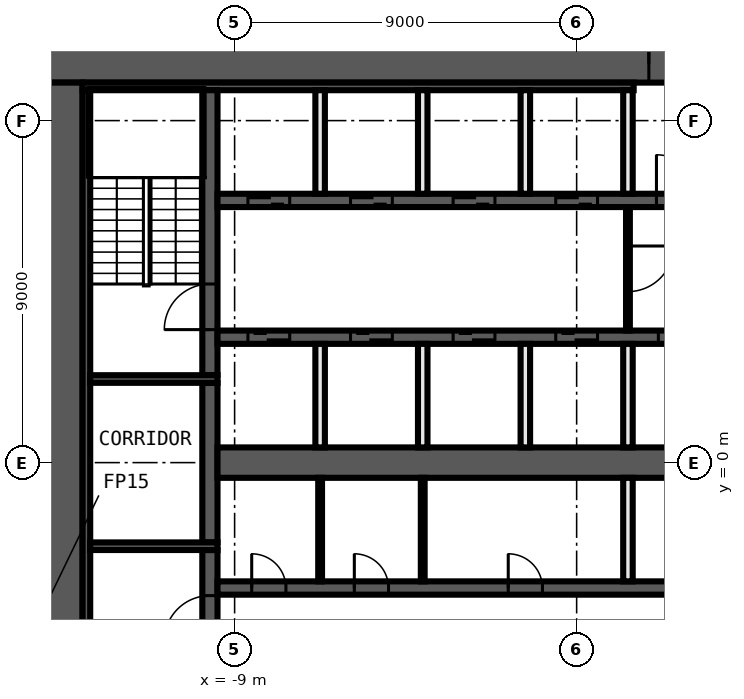
"""IFC4 building model, lengths in metres.
Left out: names, types, materials, properties, quantities, classifications, styles, units other than length and angle.
Written with IfcOpenShell. Run it as: python <this file> out.ifc"""

import sys

from ifc_helpers import new_model, si_unit, direction, frame, frame_2d, origin, place, context, subcontext, project, spatial, rectangle, extrude, element, fill, save


model = new_model("IFC4")
c1 = context("Model", 3, precision=1e-05, world=origin(), true_north=direction((0.0, 1.0)))
c2 = subcontext(c1, "Body", "Model", "MODEL_VIEW")
j1 = project(units=[si_unit("LENGTHUNIT", "METRE"), si_unit("PLANEANGLEUNIT", "RADIAN")], contexts=[c1])
p1 = place(None, origin())
s1 = spatial("IfcSite", under=j1, at=p1, CompositionType="ELEMENT")
p2 = place(p1, origin())
s2 = spatial("IfcBuilding", under=s1, at=p2, CompositionType="ELEMENT")
p3 = place(p2, frame((0.0, 0.0, 102.6)))
s3 = spatial("IfcBuildingStorey", under=s2, at=p3, CompositionType="ELEMENT", Elevation=102.6)
p4 = place(p3, frame((-14.0, 10.5, 0.0), z_axis=(0.0, 0.0, 1.0), x_axis=(1.0, 0.0, 0.0)))
e1 = element("IfcWall", 1, at=p4, inside=s3, PredefinedType="SHEAR", context=c2, shape_type="SweptSolid", body=[
    extrude(rectangle(XDim=28.0, YDim=1.0, at=frame_2d((14.0, 0.0))), origin(), (0.0, 0.0, 1.0), 3.3),
])
p5 = place(p4, frame((15.9, 0.0, 0.0)))
e2 = element("IfcOpeningElement", 2, at=p5, cuts=e1, PredefinedType="OPENING", context=c2, shape_type="SweptSolid", body=[
    extrude(rectangle(XDim=1.6, YDim=2.1, at=frame_2d((0.8, 1.05))), frame((0.0, 0.51, 0.0), z_axis=(0.0, -1.0, 0.0), x_axis=(1.0, 0.0, 0.0)), (0.0, 0.0, 1.0), 1.02),
])
p6 = place(p3, frame((-13.5, -10.0, 0.0), z_axis=(0.0, 0.0, 1.0), x_axis=(0.0, 1.0, 0.0)))
e3 = element("IfcWall", 3, at=p6, inside=s3, PredefinedType="SHEAR", context=c2, shape_type="SweptSolid", body=[
    extrude(rectangle(XDim=20.0, YDim=1.0, at=frame_2d((10.0, 0.0))), origin(), (0.0, 0.0, 1.0), 3.3),
])
p7 = place(p3, frame((-13.0, 9.9, 0.0), z_axis=(0.0, 0.0, 1.0), x_axis=(1.0, 0.0, 0.0)))
e4 = element("IfcWall", 4, at=p7, inside=s3, PredefinedType="SHEAR", context=c2, shape_type="SweptSolid", body=[
    extrude(rectangle(XDim=14.5, YDim=0.2, at=frame_2d((7.25, 0.0))), origin(), (0.0, 0.0, 1.0), 3.3),
])
p8 = place(p3, frame((-12.9, -9.8, 0.0), z_axis=(0.0, 0.0, 1.0), x_axis=(0.0, 1.0, 0.0)))
e5 = element("IfcWall", 5, at=p8, inside=s3, PredefinedType="SHEAR", context=c2, shape_type="SweptSolid", body=[
    extrude(rectangle(XDim=19.6, YDim=0.2, at=frame_2d((9.8, 0.0))), origin(), (0.0, 0.0, 1.0), 3.3),
])
p9 = place(p3, frame((-9.65, -9.8, 0.0), z_axis=(0.0, 0.0, 1.0), x_axis=(0.0, 1.0, 0.0)))
e6 = element("IfcWall", 6, at=p9, inside=s3, PredefinedType="SHEAR", context=c2, shape_type="SweptSolid", body=[
    extrude(rectangle(XDim=7.5, YDim=0.4, at=frame_2d((3.75, 0.0))), origin(), (0.0, 0.0, 1.0), 3.3),
])
p10 = place(p9, frame((5.1, 0.0, 0.0)))
e7 = element("IfcOpeningElement", 7, at=p10, cuts=e6, PredefinedType="OPENING", context=c2, shape_type="SweptSolid", body=[
    extrude(rectangle(XDim=1.2, YDim=2.1, at=frame_2d((0.6, 1.05))), frame((0.0, 0.21, 0.0), z_axis=(0.0, -1.0, 0.0), x_axis=(1.0, 0.0, 0.0)), (0.0, 0.0, 1.0), 0.42),
])
p11 = place(p3, frame((-9.65, -2.1, 0.0), z_axis=(0.0, 0.0, 1.0), x_axis=(0.0, 1.0, 0.0)))
e8 = element("IfcWall", 8, at=p11, inside=s3, PredefinedType="SHEAR", context=c2, shape_type="SweptSolid", body=[
    extrude(rectangle(XDim=4.2, YDim=0.4, at=frame_2d((2.1, 0.0))), origin(), (0.0, 0.0, 1.0), 3.3),
])
p12 = place(p3, frame((-9.65, 2.3, 0.0), z_axis=(0.0, 0.0, 1.0), x_axis=(0.0, 1.0, 0.0)))
e9 = element("IfcWall", 9, at=p12, inside=s3, PredefinedType="SHEAR", context=c2, shape_type="SweptSolid", body=[
    extrude(rectangle(XDim=7.5, YDim=0.4, at=frame_2d((3.75, 0.0))), origin(), (0.0, 0.0, 1.0), 3.3),
])
p13 = place(p12, frame((1.2, 0.0, 0.0)))
e10 = element("IfcOpeningElement", 10, at=p13, cuts=e9, PredefinedType="OPENING", context=c2, shape_type="SweptSolid", body=[
    extrude(rectangle(XDim=1.2, YDim=2.1, at=frame_2d((0.6, 1.05))), frame((0.0, 0.21, 0.0), z_axis=(0.0, -1.0, 0.0), x_axis=(1.0, 0.0, 0.0)), (0.0, 0.0, 1.0), 0.42),
])
for number, where, z_axis, x_axis in (
    (11, (-9.45, 2.2, 0.0), (0.0, 0.0, 1.0), (-1.0, 0.0, 0.0)),
    (12, (-9.45, -2.2, 0.0), (0.0, 0.0, 1.0), (-1.0, 0.0, 0.0)),
):
    element("IfcWall", number, at=place(p3, frame(where, z_axis=z_axis, x_axis=x_axis)), inside=s3, PredefinedType="SHEAR", context=c2, shape_type="SweptSolid", body=[
        extrude(rectangle(XDim=3.35, YDim=0.2, at=frame_2d((1.675, 0.0))), origin(), (0.0, 0.0, 1.0), 3.3),
    ])
p14 = place(p3, frame((-9.45, 6.9, 0.0), z_axis=(0.0, 0.0, 1.0), x_axis=(1.0, 0.0, 0.0)))
e13 = element("IfcWall", 13, at=p14, inside=s3, PredefinedType="SHEAR", context=c2, shape_type="SweptSolid", body=[
    extrude(rectangle(XDim=18.9, YDim=0.35, at=frame_2d((9.45, 0.0))), origin(), (0.0, 0.0, 1.0), 3.3),
])
p15 = place(p14, frame((0.8, 0.0, 0.0)))
e14 = element("IfcOpeningElement", 14, at=p15, cuts=e13, PredefinedType="OPENING", context=c2, shape_type="SweptSolid", body=[
    extrude(rectangle(XDim=1.1, YDim=2.1, at=frame_2d((0.55, 1.05))), frame((0.0, 0.185, 0.0), z_axis=(0.0, -1.0, 0.0), x_axis=(1.0, 0.0, 0.0)), (0.0, 0.0, 1.0), 0.37),
])
p16 = place(p14, frame((3.5, 0.0, 0.0)))
e15 = element("IfcOpeningElement", 15, at=p16, cuts=e13, PredefinedType="OPENING", context=c2, shape_type="SweptSolid", body=[
    extrude(rectangle(XDim=1.1, YDim=2.1, at=frame_2d((0.55, 1.05))), frame((0.0, 0.185, 0.0), z_axis=(0.0, -1.0, 0.0), x_axis=(1.0, 0.0, 0.0)), (0.0, 0.0, 1.0), 0.37),
])
p17 = place(p14, frame((6.2, 0.0, 0.0)))
e16 = element("IfcOpeningElement", 16, at=p17, cuts=e13, PredefinedType="OPENING", context=c2, shape_type="SweptSolid", body=[
    extrude(rectangle(XDim=1.1, YDim=2.1, at=frame_2d((0.55, 1.05))), frame((0.0, 0.185, 0.0), z_axis=(0.0, -1.0, 0.0), x_axis=(1.0, 0.0, 0.0)), (0.0, 0.0, 1.0), 0.37),
])
p18 = place(p14, frame((8.9, 0.0, 0.0)))
e17 = element("IfcOpeningElement", 17, at=p18, cuts=e13, PredefinedType="OPENING", context=c2, shape_type="SweptSolid", body=[
    extrude(rectangle(XDim=1.1, YDim=2.1, at=frame_2d((0.55, 1.05))), frame((0.0, 0.185, 0.0), z_axis=(0.0, -1.0, 0.0), x_axis=(1.0, 0.0, 0.0)), (0.0, 0.0, 1.0), 0.37),
])
p19 = place(p14, frame((11.55, 0.0, 0.0)))
e18 = element("IfcOpeningElement", 18, at=p19, cuts=e13, PredefinedType="OPENING", context=c2, shape_type="SweptSolid", body=[
    extrude(rectangle(XDim=1.2, YDim=2.1, at=frame_2d((0.6, 1.05))), frame((0.0, 0.185, 0.0), z_axis=(0.0, -1.0, 0.0), x_axis=(1.0, 0.0, 0.0)), (0.0, 0.0, 1.0), 0.37),
])
p20 = place(p14, frame((14.3, 0.0, 0.0)))
e19 = element("IfcOpeningElement", 19, at=p20, cuts=e13, PredefinedType="OPENING", context=c2, shape_type="SweptSolid", body=[
    extrude(rectangle(XDim=1.1, YDim=2.1, at=frame_2d((0.55, 1.05))), frame((0.0, 0.185, 0.0), z_axis=(0.0, -1.0, 0.0), x_axis=(1.0, 0.0, 0.0)), (0.0, 0.0, 1.0), 0.37),
])
p21 = place(p14, frame((17.0, 0.0, 0.0)))
e20 = element("IfcOpeningElement", 20, at=p21, cuts=e13, PredefinedType="OPENING", context=c2, shape_type="SweptSolid", body=[
    extrude(rectangle(XDim=1.1, YDim=2.1, at=frame_2d((0.55, 1.05))), frame((0.0, 0.185, 0.0), z_axis=(0.0, -1.0, 0.0), x_axis=(1.0, 0.0, 0.0)), (0.0, 0.0, 1.0), 0.37),
])
p22 = place(p3, frame((9.45, 3.3, 0.0), z_axis=(0.0, 0.0, 1.0), x_axis=(-1.0, 0.0, 0.0)))
e21 = element("IfcWall", 21, at=p22, inside=s3, PredefinedType="SHEAR", context=c2, shape_type="SweptSolid", body=[
    extrude(rectangle(XDim=18.9, YDim=0.35, at=frame_2d((9.45, 0.0))), origin(), (0.0, 0.0, 1.0), 3.3),
])
p23 = place(p22, frame((17.0, 0.0, 0.0)))
e22 = element("IfcOpeningElement", 22, at=p23, cuts=e21, PredefinedType="OPENING", context=c2, shape_type="SweptSolid", body=[
    extrude(rectangle(XDim=1.1, YDim=2.1, at=frame_2d((0.55, 1.05))), frame((0.0, 0.185, 0.0), z_axis=(0.0, -1.0, 0.0), x_axis=(1.0, 0.0, 0.0)), (0.0, 0.0, 1.0), 0.37),
])
p24 = place(p22, frame((14.3, 0.0, 0.0)))
e23 = element("IfcOpeningElement", 23, at=p24, cuts=e21, PredefinedType="OPENING", context=c2, shape_type="SweptSolid", body=[
    extrude(rectangle(XDim=1.1, YDim=2.1, at=frame_2d((0.55, 1.05))), frame((0.0, 0.185, 0.0), z_axis=(0.0, -1.0, 0.0), x_axis=(1.0, 0.0, 0.0)), (0.0, 0.0, 1.0), 0.37),
])
p25 = place(p22, frame((11.6, 0.0, 0.0)))
e24 = element("IfcOpeningElement", 24, at=p25, cuts=e21, PredefinedType="OPENING", context=c2, shape_type="SweptSolid", body=[
    extrude(rectangle(XDim=1.1, YDim=2.1, at=frame_2d((0.55, 1.05))), frame((0.0, 0.185, 0.0), z_axis=(0.0, -1.0, 0.0), x_axis=(1.0, 0.0, 0.0)), (0.0, 0.0, 1.0), 0.37),
])
p26 = place(p22, frame((8.9, 0.0, 0.0)))
e25 = element("IfcOpeningElement", 25, at=p26, cuts=e21, PredefinedType="OPENING", context=c2, shape_type="SweptSolid", body=[
    extrude(rectangle(XDim=1.1, YDim=2.1, at=frame_2d((0.55, 1.05))), frame((0.0, 0.185, 0.0), z_axis=(0.0, -1.0, 0.0), x_axis=(1.0, 0.0, 0.0)), (0.0, 0.0, 1.0), 0.37),
])
p27 = place(p22, frame((6.2, 0.0, 0.0)))
e26 = element("IfcOpeningElement", 26, at=p27, cuts=e21, PredefinedType="OPENING", context=c2, shape_type="SweptSolid", body=[
    extrude(rectangle(XDim=1.1, YDim=2.1, at=frame_2d((0.55, 1.05))), frame((0.0, 0.185, 0.0), z_axis=(0.0, -1.0, 0.0), x_axis=(1.0, 0.0, 0.0)), (0.0, 0.0, 1.0), 0.37),
])
p28 = place(p22, frame((3.5, 0.0, 0.0)))
e27 = element("IfcOpeningElement", 27, at=p28, cuts=e21, PredefinedType="OPENING", context=c2, shape_type="SweptSolid", body=[
    extrude(rectangle(XDim=1.1, YDim=2.1, at=frame_2d((0.55, 1.05))), frame((0.0, 0.185, 0.0), z_axis=(0.0, -1.0, 0.0), x_axis=(1.0, 0.0, 0.0)), (0.0, 0.0, 1.0), 0.37),
])
p29 = place(p22, frame((0.9, 0.0, 0.0)))
e28 = element("IfcOpeningElement", 28, at=p29, cuts=e21, PredefinedType="OPENING", context=c2, shape_type="SweptSolid", body=[
    extrude(rectangle(XDim=0.9, YDim=2.1, at=frame_2d((0.45, 1.05))), frame((0.0, 0.185, 0.0), z_axis=(0.0, -1.0, 0.0), x_axis=(1.0, 0.0, 0.0)), (0.0, 0.0, 1.0), 0.37),
])
p30 = place(p3, frame((-9.45, -3.3, 0.0), z_axis=(0.0, 0.0, 1.0), x_axis=(1.0, 0.0, 0.0)))
e29 = element("IfcWall", 29, at=p30, inside=s3, PredefinedType="SHEAR", context=c2, shape_type="SweptSolid", body=[
    extrude(rectangle(XDim=18.9, YDim=0.35, at=frame_2d((9.45, 0.0))), origin(), (0.0, 0.0, 1.0), 3.3),
])
p31 = place(p30, frame((17.0, 0.0, 0.0)))
e30 = element("IfcOpeningElement", 30, at=p31, cuts=e29, PredefinedType="OPENING", context=c2, shape_type="SweptSolid", body=[
    extrude(rectangle(XDim=1.1, YDim=2.1, at=frame_2d((0.55, 1.05))), frame((0.0, 0.185, 0.0), z_axis=(0.0, -1.0, 0.0), x_axis=(1.0, 0.0, 0.0)), (0.0, 0.0, 1.0), 0.37),
])
p32 = place(p30, frame((0.9, 0.0, 0.0)))
e31 = element("IfcOpeningElement", 31, at=p32, cuts=e29, PredefinedType="OPENING", context=c2, shape_type="SweptSolid", body=[
    extrude(rectangle(XDim=0.9, YDim=2.1, at=frame_2d((0.45, 1.05))), frame((0.0, 0.185, 0.0), z_axis=(0.0, -1.0, 0.0), x_axis=(1.0, 0.0, 0.0)), (0.0, 0.0, 1.0), 0.37),
])
p33 = place(p30, frame((3.6, 0.0, 0.0)))
e32 = element("IfcOpeningElement", 32, at=p33, cuts=e29, PredefinedType="OPENING", context=c2, shape_type="SweptSolid", body=[
    extrude(rectangle(XDim=0.9, YDim=2.1, at=frame_2d((0.45, 1.05))), frame((0.0, 0.185, 0.0), z_axis=(0.0, -1.0, 0.0), x_axis=(1.0, 0.0, 0.0)), (0.0, 0.0, 1.0), 0.37),
])
p34 = place(p30, frame((7.65, 0.0, 0.0)))
e33 = element("IfcOpeningElement", 33, at=p34, cuts=e29, PredefinedType="OPENING", context=c2, shape_type="SweptSolid", body=[
    extrude(rectangle(XDim=0.9, YDim=2.1, at=frame_2d((0.45, 1.05))), frame((0.0, 0.185, 0.0), z_axis=(0.0, -1.0, 0.0), x_axis=(1.0, 0.0, 0.0)), (0.0, 0.0, 1.0), 0.37),
])
p35 = place(p3, frame((-9.45, 0.0, 0.0), z_axis=(0.0, 0.0, 1.0), x_axis=(1.0, 0.0, 0.0)))
e34 = element("IfcWall", 34, at=p35, inside=s3, PredefinedType="SHEAR", context=c2, shape_type="SweptSolid", body=[
    extrude(rectangle(XDim=18.9, YDim=0.8, at=frame_2d((9.45, 0.0))), origin(), (0.0, 0.0, 1.0), 3.3),
])
p36 = place(p3, frame((1.35, 6.725, 0.0), z_axis=(0.0, 0.0, 1.0), x_axis=(0.0, -1.0, 0.0)))
e35 = element("IfcWall", 35, at=p36, inside=s3, PredefinedType="PARTITIONING", context=c2, shape_type="SweptSolid", body=[
    extrude(rectangle(XDim=3.25, YDim=0.1, at=frame_2d((1.625, 0.0))), origin(), (0.0, 0.0, 1.0), 3.3),
])
p37 = place(p36, frame((1.025, 0.0, 0.0)))
e36 = element("IfcOpeningElement", 36, at=p37, cuts=e35, PredefinedType="OPENING", context=c2, shape_type="SweptSolid", body=[
    extrude(rectangle(XDim=1.2, YDim=2.1, at=frame_2d((0.6, 1.05))), frame((0.0, 0.06, 0.0), z_axis=(0.0, -1.0, 0.0), x_axis=(1.0, 0.0, 0.0)), (0.0, 0.0, 1.0), 0.12),
])
for number, where, z_axis, x_axis in (
    (37, (1.35, -3.125, 0.0), (0.0, 0.0, 1.0), (0.0, 1.0, 0.0)),
    (38, (1.35, 0.4, 0.0), (0.0, 0.0, 1.0), (0.0, 1.0, 0.0)),
    (39, (1.35, 7.075, 0.0), (0.0, 0.0, 1.0), (0.0, 1.0, 0.0)),
    (40, (-1.35, 0.4, 0.0), (0.0, 0.0, 1.0), (0.0, 1.0, 0.0)),
    (41, (-1.35, 7.075, 0.0), (0.0, 0.0, 1.0), (0.0, 1.0, 0.0)),
):
    element("IfcWall", number, at=place(p3, frame(where, z_axis=z_axis, x_axis=x_axis)), inside=s3, PredefinedType="SOLIDWALL", context=c2, shape_type="SweptSolid", body=[
        extrude(rectangle(XDim=2.725, YDim=0.25, at=frame_2d((1.363, 0.0))), origin(), (0.0, 0.0, 1.0), 3.3),
    ])
p38 = place(p3, frame((-4.05, -3.125, 0.0), z_axis=(0.0, 0.0, 1.0), x_axis=(0.0, 1.0, 0.0)))
e42 = element("IfcWall", 42, at=p38, inside=s3, PredefinedType="PARTITIONING", context=c2, shape_type="SweptSolid", body=[
    extrude(rectangle(XDim=2.725, YDim=0.1, at=frame_2d((1.363, 0.0))), origin(), (0.0, 0.0, 1.0), 3.3),
])
for number, where, z_axis, x_axis in (
    (43, (-4.05, 0.4, 0.0), (0.0, 0.0, 1.0), (0.0, 1.0, 0.0)),
    (44, (-4.05, 7.075, 0.0), (0.0, 0.0, 1.0), (0.0, 1.0, 0.0)),
):
    element("IfcWall", number, at=place(p3, frame(where, z_axis=z_axis, x_axis=x_axis)), inside=s3, PredefinedType="SOLIDWALL", context=c2, shape_type="SweptSolid", body=[
        extrude(rectangle(XDim=2.725, YDim=0.25, at=frame_2d((1.363, 0.0))), origin(), (0.0, 0.0, 1.0), 3.3),
    ])
p39 = place(p3, frame((-6.75, -3.125, 0.0), z_axis=(0.0, 0.0, 1.0), x_axis=(0.0, 1.0, 0.0)))
e45 = element("IfcWall", 45, at=p39, inside=s3, PredefinedType="PARTITIONING", context=c2, shape_type="SweptSolid", body=[
    extrude(rectangle(XDim=2.725, YDim=0.1, at=frame_2d((1.363, 0.0))), origin(), (0.0, 0.0, 1.0), 3.3),
])
for number, where, z_axis, x_axis in (
    (46, (-6.75, 0.4, 0.0), (0.0, 0.0, 1.0), (0.0, 1.0, 0.0)),
    (47, (-6.75, 7.075, 0.0), (0.0, 0.0, 1.0), (0.0, 1.0, 0.0)),
):
    element("IfcWall", number, at=place(p3, frame(where, z_axis=z_axis, x_axis=x_axis)), inside=s3, PredefinedType="SOLIDWALL", context=c2, shape_type="SweptSolid", body=[
        extrude(rectangle(XDim=2.725, YDim=0.25, at=frame_2d((1.363, 0.0))), origin(), (0.0, 0.0, 1.0), 3.3),
    ])
p40 = place(p15, origin())
e48 = element("IfcDoor", 48, at=p40, inside=s3, OperationType="DOUBLE_DOOR_SLIDING", PredefinedType="DOOR", context=c2, shape_type="SweptSolid", body=[
    extrude(rectangle(XDim=1.1, YDim=2.1, at=frame_2d((0.55, 1.05))), frame((0.0, 0.025, 0.0), z_axis=(0.0, -1.0, 0.0), x_axis=(1.0, 0.0, 0.0)), (0.0, 0.0, 1.0), 0.05),
])
fill(e14, e48)
p41 = place(p16, origin())
e49 = element("IfcDoor", 49, at=p41, inside=s3, OperationType="DOUBLE_DOOR_SLIDING", PredefinedType="DOOR", context=c2, shape_type="SweptSolid", body=[
    extrude(rectangle(XDim=1.1, YDim=2.1, at=frame_2d((0.55, 1.05))), frame((0.0, 0.025, 0.0), z_axis=(0.0, -1.0, 0.0), x_axis=(1.0, 0.0, 0.0)), (0.0, 0.0, 1.0), 0.05),
])
fill(e15, e49)
p42 = place(p17, origin())
e50 = element("IfcDoor", 50, at=p42, inside=s3, OperationType="DOUBLE_DOOR_SLIDING", PredefinedType="DOOR", context=c2, shape_type="SweptSolid", body=[
    extrude(rectangle(XDim=1.1, YDim=2.1, at=frame_2d((0.55, 1.05))), frame((0.0, 0.025, 0.0), z_axis=(0.0, -1.0, 0.0), x_axis=(1.0, 0.0, 0.0)), (0.0, 0.0, 1.0), 0.05),
])
fill(e16, e50)
p43 = place(p18, origin())
e51 = element("IfcDoor", 51, at=p43, inside=s3, OperationType="DOUBLE_DOOR_SLIDING", PredefinedType="DOOR", context=c2, shape_type="SweptSolid", body=[
    extrude(rectangle(XDim=1.1, YDim=2.1, at=frame_2d((0.55, 1.05))), frame((0.0, 0.025, 0.0), z_axis=(0.0, -1.0, 0.0), x_axis=(1.0, 0.0, 0.0)), (0.0, 0.0, 1.0), 0.05),
])
fill(e17, e51)
p44 = place(p5, origin())
e52 = element("IfcDoor", 52, at=p44, inside=s3, OperationType="DOUBLE_DOOR_SINGLE_SWING", PredefinedType="DOOR", context=c2, shape_type="SweptSolid", body=[
    extrude(rectangle(XDim=1.6, YDim=2.1, at=frame_2d((0.8, 1.05))), frame((0.0, 0.025, 0.0), z_axis=(0.0, -1.0, 0.0), x_axis=(1.0, 0.0, 0.0)), (0.0, 0.0, 1.0), 0.05),
])
fill(e2, e52)
p45 = place(p19, origin())
e53 = element("IfcDoor", 53, at=p45, inside=s3, OperationType="SINGLE_SWING_LEFT", PredefinedType="DOOR", context=c2, shape_type="SweptSolid", body=[
    extrude(rectangle(XDim=1.2, YDim=2.1, at=frame_2d((0.6, 1.05))), frame((0.0, 0.025, 0.0), z_axis=(0.0, -1.0, 0.0), x_axis=(1.0, 0.0, 0.0)), (0.0, 0.0, 1.0), 0.05),
])
fill(e18, e53)
p46 = place(p23, origin())
e54 = element("IfcDoor", 54, at=p46, inside=s3, OperationType="DOUBLE_DOOR_SLIDING", PredefinedType="DOOR", context=c2, shape_type="SweptSolid", body=[
    extrude(rectangle(XDim=1.1, YDim=2.1, at=frame_2d((0.55, 1.05))), frame((0.0, 0.025, 0.0), z_axis=(0.0, -1.0, 0.0), x_axis=(1.0, 0.0, 0.0)), (0.0, 0.0, 1.0), 0.05),
])
fill(e22, e54)
p47 = place(p24, origin())
e55 = element("IfcDoor", 55, at=p47, inside=s3, OperationType="DOUBLE_DOOR_SLIDING", PredefinedType="DOOR", context=c2, shape_type="SweptSolid", body=[
    extrude(rectangle(XDim=1.1, YDim=2.1, at=frame_2d((0.55, 1.05))), frame((0.0, 0.025, 0.0), z_axis=(0.0, -1.0, 0.0), x_axis=(1.0, 0.0, 0.0)), (0.0, 0.0, 1.0), 0.05),
])
fill(e23, e55)
p48 = place(p25, origin())
e56 = element("IfcDoor", 56, at=p48, inside=s3, OperationType="DOUBLE_DOOR_SLIDING", PredefinedType="DOOR", context=c2, shape_type="SweptSolid", body=[
    extrude(rectangle(XDim=1.1, YDim=2.1, at=frame_2d((0.55, 1.05))), frame((0.0, 0.025, 0.0), z_axis=(0.0, -1.0, 0.0), x_axis=(1.0, 0.0, 0.0)), (0.0, 0.0, 1.0), 0.05),
])
fill(e24, e56)
p49 = place(p26, origin())
e57 = element("IfcDoor", 57, at=p49, inside=s3, OperationType="DOUBLE_DOOR_SLIDING", PredefinedType="DOOR", context=c2, shape_type="SweptSolid", body=[
    extrude(rectangle(XDim=1.1, YDim=2.1, at=frame_2d((0.55, 1.05))), frame((0.0, 0.025, 0.0), z_axis=(0.0, -1.0, 0.0), x_axis=(1.0, 0.0, 0.0)), (0.0, 0.0, 1.0), 0.05),
])
fill(e25, e57)
p50 = place(p27, origin())
e58 = element("IfcDoor", 58, at=p50, inside=s3, OperationType="DOUBLE_DOOR_SLIDING", PredefinedType="DOOR", context=c2, shape_type="SweptSolid", body=[
    extrude(rectangle(XDim=1.1, YDim=2.1, at=frame_2d((0.55, 1.05))), frame((0.0, 0.025, 0.0), z_axis=(0.0, -1.0, 0.0), x_axis=(1.0, 0.0, 0.0)), (0.0, 0.0, 1.0), 0.05),
])
fill(e26, e58)
p51 = place(p32, origin())
e59 = element("IfcDoor", 59, at=p51, inside=s3, OperationType="SINGLE_SWING_RIGHT", PredefinedType="DOOR", context=c2, shape_type="SweptSolid", body=[
    extrude(rectangle(XDim=0.9, YDim=2.1, at=frame_2d((0.45, 1.05))), frame((0.0, 0.025, 0.0), z_axis=(0.0, -1.0, 0.0), x_axis=(1.0, 0.0, 0.0)), (0.0, 0.0, 1.0), 0.05),
])
fill(e31, e59)
p52 = place(p33, origin())
e60 = element("IfcDoor", 60, at=p52, inside=s3, OperationType="SINGLE_SWING_LEFT", PredefinedType="DOOR", context=c2, shape_type="SweptSolid", body=[
    extrude(rectangle(XDim=0.9, YDim=2.1, at=frame_2d((0.45, 1.05))), frame((0.0, 0.025, 0.0), z_axis=(0.0, -1.0, 0.0), x_axis=(1.0, 0.0, 0.0)), (0.0, 0.0, 1.0), 0.05),
])
fill(e32, e60)
p53 = place(p34, origin())
e61 = element("IfcDoor", 61, at=p53, inside=s3, OperationType="SINGLE_SWING_RIGHT", PredefinedType="DOOR", context=c2, shape_type="SweptSolid", body=[
    extrude(rectangle(XDim=0.9, YDim=2.1, at=frame_2d((0.45, 1.05))), frame((0.0, 0.025, 0.0), z_axis=(0.0, -1.0, 0.0), x_axis=(1.0, 0.0, 0.0)), (0.0, 0.0, 1.0), 0.05),
])
fill(e33, e61)
p54 = place(p13, origin())
e62 = element("IfcDoor", 62, at=p54, inside=s3, OperationType="SINGLE_SWING_RIGHT", PredefinedType="DOOR", context=c2, shape_type="SweptSolid", body=[
    extrude(rectangle(XDim=1.2, YDim=2.1, at=frame_2d((0.6, 1.05))), frame((0.0, 0.025, 0.0), z_axis=(0.0, -1.0, 0.0), x_axis=(1.0, 0.0, 0.0)), (0.0, 0.0, 1.0), 0.05),
])
fill(e10, e62)
p55 = place(p10, origin())
e63 = element("IfcDoor", 63, at=p55, inside=s3, OperationType="SINGLE_SWING_LEFT", PredefinedType="DOOR", context=c2, shape_type="SweptSolid", body=[
    extrude(rectangle(XDim=1.2, YDim=2.1, at=frame_2d((0.6, 1.05))), frame((0.0, 0.025, 0.0), z_axis=(0.0, -1.0, 0.0), x_axis=(1.0, 0.0, 0.0)), (0.0, 0.0, 1.0), 0.05),
])
fill(e7, e63)
p56 = place(p37, origin())
e64 = element("IfcDoor", 64, at=p56, inside=s3, OperationType="SINGLE_SWING_LEFT", PredefinedType="DOOR", context=c2, shape_type="SweptSolid", body=[
    extrude(rectangle(XDim=1.2, YDim=2.1, at=frame_2d((0.6, 1.05))), frame((0.0, 0.025, 0.0), z_axis=(0.0, -1.0, 0.0), x_axis=(1.0, 0.0, 0.0)), (0.0, 0.0, 1.0), 0.05),
])
fill(e36, e64)
save(model, sys.argv[1])
